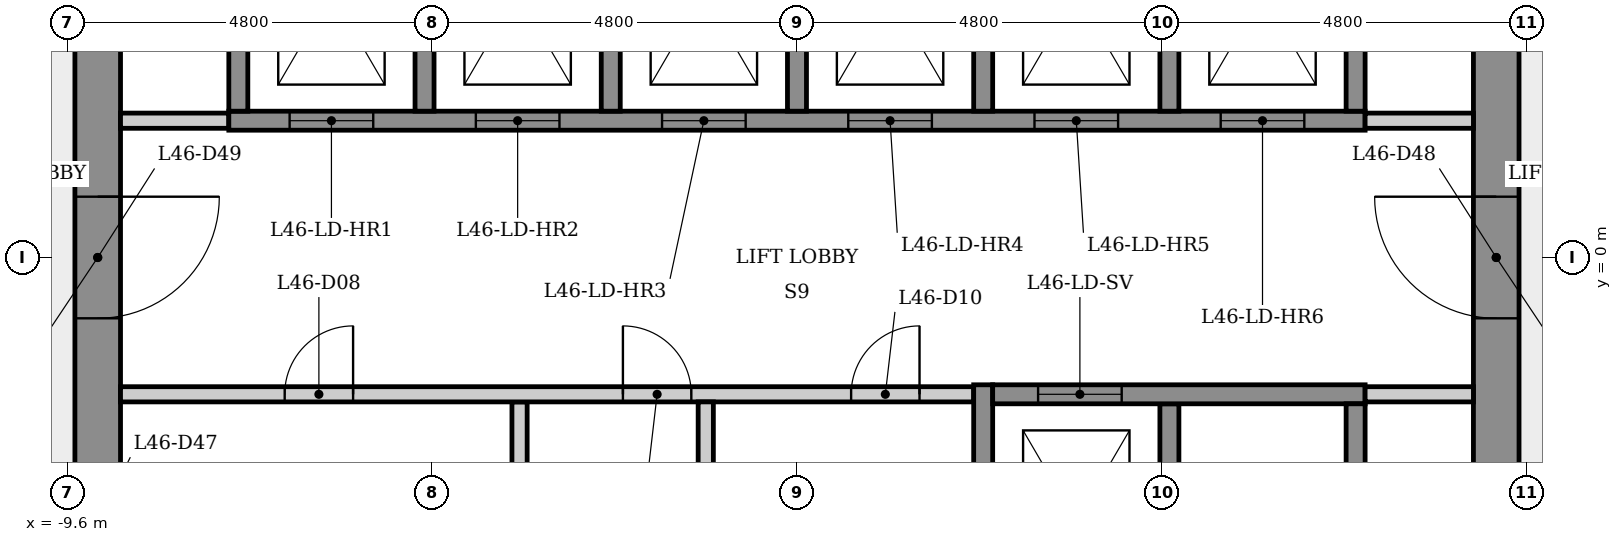
"""IFC4 building model, lengths in metres.
Left out: names, types, materials, properties, quantities, classifications, styles, units other than length and angle.
Written with IfcOpenShell. Run it as: python <this file> out.ifc"""

import sys

from ifc_helpers import new_model, si_unit, direction, frame, frame_2d, origin, place, context, subcontext, project, spatial, rectangle, extrude, element, fill, save


model = new_model("IFC4")
c1 = context("Model", 3, precision=1e-05, world=origin(), true_north=direction((0.0, 1.0)))
c2 = subcontext(c1, "Body", "Model", "MODEL_VIEW")
j1 = project(units=[si_unit("LENGTHUNIT", "METRE"), si_unit("PLANEANGLEUNIT", "RADIAN")], contexts=[c1])
p1 = place(None, origin())
s1 = spatial("IfcSite", under=j1, at=p1, CompositionType="ELEMENT")
p2 = place(p1, origin())
s2 = spatial("IfcBuilding", under=s1, at=p2, CompositionType="ELEMENT")
p3 = place(p2, frame((0.0, 0.0, 173.1)))
s3 = spatial("IfcBuildingStorey", under=s2, at=p3, CompositionType="ELEMENT", Elevation=173.1)
p4 = place(p3, frame((9.2, -5.485, 0.0), z_axis=(0.0, 0.0, 1.0), x_axis=(0.0, 1.0, 0.0)))
e1 = element("IfcWall", 1, at=p4, inside=s3, PredefinedType="SHEAR", context=c2, shape_type="SweptSolid", body=[
    extrude(rectangle(XDim=10.97, YDim=0.6, at=frame_2d((5.485, 0.0))), origin(), (0.0, 0.0, 1.0), 3.4),
])
p5 = place(p4, frame((4.685, 0.0, 0.0)))
e2 = element("IfcOpeningElement", 2, at=p5, cuts=e1, PredefinedType="OPENING", context=c2, shape_type="SweptSolid", body=[
    extrude(rectangle(XDim=1.6, YDim=2.1, at=frame_2d((0.8, 1.05))), frame((0.0, 0.31, 0.0), z_axis=(0.0, -1.0, 0.0), x_axis=(1.0, 0.0, 0.0)), (0.0, 0.0, 1.0), 0.62),
])
p6 = place(p3, frame((-9.2, 5.485, 0.0), z_axis=(0.0, 0.0, 1.0), x_axis=(0.0, -1.0, 0.0)))
e3 = element("IfcWall", 3, at=p6, inside=s3, PredefinedType="SHEAR", context=c2, shape_type="SweptSolid", body=[
    extrude(rectangle(XDim=10.97, YDim=0.6, at=frame_2d((5.485, 0.0))), origin(), (0.0, 0.0, 1.0), 3.4),
])
p7 = place(p6, frame((8.516, 0.0, 0.0)))
e4 = element("IfcOpeningElement", 4, at=p7, cuts=e3, PredefinedType="OPENING", context=c2, shape_type="SweptSolid", body=[
    extrude(rectangle(XDim=0.9, YDim=2.1, at=frame_2d((0.45, 1.05))), frame((0.0, 0.31, 0.0), z_axis=(0.0, -1.0, 0.0), x_axis=(1.0, 0.0, 0.0)), (0.0, 0.0, 1.0), 0.62),
])
p8 = place(p6, frame((4.685, 0.0, 0.0)))
e5 = element("IfcOpeningElement", 5, at=p8, cuts=e3, PredefinedType="OPENING", context=c2, shape_type="SweptSolid", body=[
    extrude(rectangle(XDim=1.6, YDim=2.1, at=frame_2d((0.8, 1.05))), frame((0.0, 0.31, 0.0), z_axis=(0.0, -1.0, 0.0), x_axis=(1.0, 0.0, 0.0)), (0.0, 0.0, 1.0), 0.62),
])
p9 = place(p3, frame((-8.9, 1.8, 0.0), z_axis=(0.0, 0.0, 1.0), x_axis=(1.0, 0.0, 0.0)))
e6 = element("IfcWall", 6, at=p9, inside=s3, PredefinedType="PARTITIONING", context=c2, shape_type="SweptSolid", body=[
    extrude(rectangle(XDim=1.425, YDim=0.2, at=frame_2d((0.712, 0.0))), origin(), (0.0, 0.0, 1.0), 3.05),
])
p10 = place(p3, frame((-7.475, 1.8, 0.0), z_axis=(0.0, 0.0, 1.0), x_axis=(1.0, 0.0, 0.0)))
e7 = element("IfcWall", 7, at=p10, inside=s3, PredefinedType="SHEAR", context=c2, shape_type="SweptSolid", body=[
    extrude(rectangle(XDim=14.95, YDim=0.25, at=frame_2d((7.475, 0.0))), origin(), (0.0, 0.0, 1.0), 3.05),
])
p11 = place(p10, frame((0.8, 0.0, 0.0)))
e8 = element("IfcOpeningElement", 8, at=p11, cuts=e7, PredefinedType="OPENING", context=c2, shape_type="SweptSolid", body=[
    extrude(rectangle(XDim=1.1, YDim=2.1, at=frame_2d((0.55, 1.05))), frame((0.0, 0.135, 0.0), z_axis=(0.0, -1.0, 0.0), x_axis=(1.0, 0.0, 0.0)), (0.0, 0.0, 1.0), 0.27),
])
p12 = place(p10, frame((3.25, 0.0, 0.0)))
e9 = element("IfcOpeningElement", 9, at=p12, cuts=e7, PredefinedType="OPENING", context=c2, shape_type="SweptSolid", body=[
    extrude(rectangle(XDim=1.1, YDim=2.1, at=frame_2d((0.55, 1.05))), frame((0.0, 0.135, 0.0), z_axis=(0.0, -1.0, 0.0), x_axis=(1.0, 0.0, 0.0)), (0.0, 0.0, 1.0), 0.27),
])
p13 = place(p10, frame((5.7, 0.0, 0.0)))
e10 = element("IfcOpeningElement", 10, at=p13, cuts=e7, PredefinedType="OPENING", context=c2, shape_type="SweptSolid", body=[
    extrude(rectangle(XDim=1.1, YDim=2.1, at=frame_2d((0.55, 1.05))), frame((0.0, 0.135, 0.0), z_axis=(0.0, -1.0, 0.0), x_axis=(1.0, 0.0, 0.0)), (0.0, 0.0, 1.0), 0.27),
])
p14 = place(p10, frame((8.15, 0.0, 0.0)))
e11 = element("IfcOpeningElement", 11, at=p14, cuts=e7, PredefinedType="OPENING", context=c2, shape_type="SweptSolid", body=[
    extrude(rectangle(XDim=1.1, YDim=2.1, at=frame_2d((0.55, 1.05))), frame((0.0, 0.135, 0.0), z_axis=(0.0, -1.0, 0.0), x_axis=(1.0, 0.0, 0.0)), (0.0, 0.0, 1.0), 0.27),
])
p15 = place(p10, frame((10.6, 0.0, 0.0)))
e12 = element("IfcOpeningElement", 12, at=p15, cuts=e7, PredefinedType="OPENING", context=c2, shape_type="SweptSolid", body=[
    extrude(rectangle(XDim=1.1, YDim=2.1, at=frame_2d((0.55, 1.05))), frame((0.0, 0.135, 0.0), z_axis=(0.0, -1.0, 0.0), x_axis=(1.0, 0.0, 0.0)), (0.0, 0.0, 1.0), 0.27),
])
p16 = place(p10, frame((13.05, 0.0, 0.0)))
e13 = element("IfcOpeningElement", 13, at=p16, cuts=e7, PredefinedType="OPENING", context=c2, shape_type="SweptSolid", body=[
    extrude(rectangle(XDim=1.1, YDim=2.1, at=frame_2d((0.55, 1.05))), frame((0.0, 0.135, 0.0), z_axis=(0.0, -1.0, 0.0), x_axis=(1.0, 0.0, 0.0)), (0.0, 0.0, 1.0), 0.27),
])
p17 = place(p3, frame((-7.35, 1.925, 0.0), z_axis=(0.0, 0.0, 1.0), x_axis=(0.0, 1.0, 0.0)))
e14 = element("IfcWall", 14, at=p17, inside=s3, PredefinedType="SHEAR", context=c2, shape_type="SweptSolid", body=[
    extrude(rectangle(XDim=4.036, YDim=0.25, at=frame_2d((2.018, 0.0))), origin(), (0.0, 0.0, 1.0), 3.05),
])
p18 = place(p3, frame((-4.9, 5.025, 0.0), z_axis=(0.0, 0.0, 1.0), x_axis=(0.0, -1.0, 0.0)))
e15 = element("IfcWall", 15, at=p18, inside=s3, PredefinedType="SHEAR", context=c2, shape_type="SweptSolid", body=[
    extrude(rectangle(XDim=3.1, YDim=0.25, at=frame_2d((1.55, 0.0))), origin(), (0.0, 0.0, 1.0), 3.4),
])
p19 = place(p3, frame((-3.65, -1.9, 0.0), z_axis=(0.0, 0.0, 1.0), x_axis=(0.0, -1.0, 0.0)))
e16 = element("IfcWall", 16, at=p19, inside=s3, PredefinedType="PARTITIONING", context=c2, shape_type="SweptSolid", body=[
    extrude(rectangle(XDim=3.15, YDim=0.2, at=frame_2d((1.575, 0.0))), origin(), (0.0, 0.0, 1.0), 3.05),
])
p20 = place(p3, frame((-8.9, -1.8, 0.0), z_axis=(0.0, 0.0, 1.0), x_axis=(1.0, 0.0, 0.0)))
e17 = element("IfcWall", 17, at=p20, inside=s3, PredefinedType="PARTITIONING", context=c2, shape_type="SweptSolid", body=[
    extrude(rectangle(XDim=11.225, YDim=0.2, at=frame_2d((5.613, 0.0))), origin(), (0.0, 0.0, 1.0), 3.05),
])
p21 = place(p20, frame((2.16, 0.0, 0.0)))
e18 = element("IfcOpeningElement", 18, at=p21, cuts=e17, PredefinedType="OPENING", context=c2, shape_type="SweptSolid", body=[
    extrude(rectangle(XDim=0.9, YDim=2.1, at=frame_2d((0.45, 1.05))), frame((0.0, 0.11, 0.0), z_axis=(0.0, -1.0, 0.0), x_axis=(1.0, 0.0, 0.0)), (0.0, 0.0, 1.0), 0.22),
])
p22 = place(p20, frame((6.61, 0.0, 0.0)))
e19 = element("IfcOpeningElement", 19, at=p22, cuts=e17, PredefinedType="OPENING", context=c2, shape_type="SweptSolid", body=[
    extrude(rectangle(XDim=0.9, YDim=2.1, at=frame_2d((0.45, 1.05))), frame((0.0, 0.11, 0.0), z_axis=(0.0, -1.0, 0.0), x_axis=(1.0, 0.0, 0.0)), (0.0, 0.0, 1.0), 0.22),
])
p23 = place(p20, frame((9.613, 0.0, 0.0)))
e20 = element("IfcOpeningElement", 20, at=p23, cuts=e17, PredefinedType="OPENING", context=c2, shape_type="SweptSolid", body=[
    extrude(rectangle(XDim=0.9, YDim=2.1, at=frame_2d((0.45, 1.05))), frame((0.0, 0.11, 0.0), z_axis=(0.0, -1.0, 0.0), x_axis=(1.0, 0.0, 0.0)), (0.0, 0.0, 1.0), 0.22),
])
p24 = place(p3, frame((-2.45, 5.025, 0.0), z_axis=(0.0, 0.0, 1.0), x_axis=(0.0, -1.0, 0.0)))
e21 = element("IfcWall", 21, at=p24, inside=s3, PredefinedType="SHEAR", context=c2, shape_type="SweptSolid", body=[
    extrude(rectangle(XDim=3.1, YDim=0.25, at=frame_2d((1.55, 0.0))), origin(), (0.0, 0.0, 1.0), 3.4),
])
p25 = place(p3, frame((-1.2, -1.9, 0.0), z_axis=(0.0, 0.0, 1.0), x_axis=(0.0, -1.0, 0.0)))
e22 = element("IfcWall", 22, at=p25, inside=s3, PredefinedType="PARTITIONING", context=c2, shape_type="SweptSolid", body=[
    extrude(rectangle(XDim=3.15, YDim=0.2, at=frame_2d((1.575, 0.0))), origin(), (0.0, 0.0, 1.0), 3.05),
])
p26 = place(p3, frame((0.0, 5.025, 0.0), z_axis=(0.0, 0.0, 1.0), x_axis=(0.0, -1.0, 0.0)))
e23 = element("IfcWall", 23, at=p26, inside=s3, PredefinedType="SHEAR", context=c2, shape_type="SweptSolid", body=[
    extrude(rectangle(XDim=3.1, YDim=0.25, at=frame_2d((1.55, 0.0))), origin(), (0.0, 0.0, 1.0), 3.4),
])
p27 = place(p3, frame((2.45, -5.275, 0.0), z_axis=(0.0, 0.0, 1.0), x_axis=(0.0, 1.0, 0.0)))
e24 = element("IfcWall", 24, at=p27, inside=s3, PredefinedType="SHEAR", context=c2, shape_type="SweptSolid", body=[
    extrude(rectangle(XDim=3.6, YDim=0.25, at=frame_2d((1.8, 0.0))), origin(), (0.0, 0.0, 1.0), 3.05),
])
for number, where, z_axis, x_axis in (
    (25, (2.45, 5.025, 0.0), (0.0, 0.0, 1.0), (0.0, -1.0, 0.0)),
    (26, (4.9, -1.925, 0.0), (0.0, 0.0, 1.0), (0.0, -1.0, 0.0)),
    (27, (4.9, 5.025, 0.0), (0.0, 0.0, 1.0), (0.0, -1.0, 0.0)),
):
    element("IfcWall", number, at=place(p3, frame(where, z_axis=z_axis, x_axis=x_axis)), inside=s3, PredefinedType="SHEAR", context=c2, shape_type="SweptSolid", body=[
        extrude(rectangle(XDim=3.1, YDim=0.25, at=frame_2d((1.55, 0.0))), origin(), (0.0, 0.0, 1.0), 3.4),
    ])
p28 = place(p3, frame((2.575, -1.8, 0.0), z_axis=(0.0, 0.0, 1.0), x_axis=(1.0, 0.0, 0.0)))
e28 = element("IfcWall", 28, at=p28, inside=s3, PredefinedType="SHEAR", context=c2, shape_type="SweptSolid", body=[
    extrude(rectangle(XDim=4.9, YDim=0.25, at=frame_2d((2.45, 0.0))), origin(), (0.0, 0.0, 1.0), 3.05),
])
p29 = place(p28, frame((0.597, 0.0, 0.0)))
e29 = element("IfcOpeningElement", 29, at=p29, cuts=e28, PredefinedType="OPENING", context=c2, shape_type="SweptSolid", body=[
    extrude(rectangle(XDim=1.1, YDim=2.1, at=frame_2d((0.55, 1.05))), frame((0.0, 0.135, 0.0), z_axis=(0.0, -1.0, 0.0), x_axis=(1.0, 0.0, 0.0)), (0.0, 0.0, 1.0), 0.27),
])
p30 = place(p3, frame((7.475, 1.8, 0.0), z_axis=(0.0, 0.0, 1.0), x_axis=(1.0, 0.0, 0.0)))
e30 = element("IfcWall", 30, at=p30, inside=s3, PredefinedType="PARTITIONING", context=c2, shape_type="SweptSolid", body=[
    extrude(rectangle(XDim=1.425, YDim=0.2, at=frame_2d((0.712, 0.0))), origin(), (0.0, 0.0, 1.0), 3.05),
])
for number, where, z_axis, x_axis in (
    (31, (7.35, -1.925, 0.0), (0.0, 0.0, 1.0), (0.0, -1.0, 0.0)),
    (32, (7.35, 5.025, 0.0), (0.0, 0.0, 1.0), (0.0, -1.0, 0.0)),
):
    element("IfcWall", number, at=place(p3, frame(where, z_axis=z_axis, x_axis=x_axis)), inside=s3, PredefinedType="SHEAR", context=c2, shape_type="SweptSolid", body=[
        extrude(rectangle(XDim=3.1, YDim=0.25, at=frame_2d((1.55, 0.0))), origin(), (0.0, 0.0, 1.0), 3.4),
    ])
p31 = place(p3, frame((8.9, -1.8, 0.0), z_axis=(0.0, 0.0, 1.0), x_axis=(-1.0, 0.0, 0.0)))
e33 = element("IfcWall", 33, at=p31, inside=s3, PredefinedType="PARTITIONING", context=c2, shape_type="SweptSolid", body=[
    extrude(rectangle(XDim=1.425, YDim=0.2, at=frame_2d((0.712, 0.0))), origin(), (0.0, 0.0, 1.0), 3.05),
])
p32 = place(p11, origin())
e34 = element("IfcDoor", 34, at=p32, inside=s3, OperationType="SLIDING_TO_LEFT", PredefinedType="DOOR", context=c2, shape_type="SweptSolid", body=[
    extrude(rectangle(XDim=1.1, YDim=2.1, at=frame_2d((0.55, 1.05))), frame((0.0, 0.025, 0.0), z_axis=(0.0, -1.0, 0.0), x_axis=(1.0, 0.0, 0.0)), (0.0, 0.0, 1.0), 0.05),
])
fill(e8, e34)
p33 = place(p12, origin())
e35 = element("IfcDoor", 35, at=p33, inside=s3, OperationType="SLIDING_TO_LEFT", PredefinedType="DOOR", context=c2, shape_type="SweptSolid", body=[
    extrude(rectangle(XDim=1.1, YDim=2.1, at=frame_2d((0.55, 1.05))), frame((0.0, 0.025, 0.0), z_axis=(0.0, -1.0, 0.0), x_axis=(1.0, 0.0, 0.0)), (0.0, 0.0, 1.0), 0.05),
])
fill(e9, e35)
p34 = place(p13, origin())
e36 = element("IfcDoor", 36, at=p34, inside=s3, OperationType="SLIDING_TO_LEFT", PredefinedType="DOOR", context=c2, shape_type="SweptSolid", body=[
    extrude(rectangle(XDim=1.1, YDim=2.1, at=frame_2d((0.55, 1.05))), frame((0.0, 0.025, 0.0), z_axis=(0.0, -1.0, 0.0), x_axis=(1.0, 0.0, 0.0)), (0.0, 0.0, 1.0), 0.05),
])
fill(e10, e36)
p35 = place(p14, origin())
e37 = element("IfcDoor", 37, at=p35, inside=s3, OperationType="SLIDING_TO_LEFT", PredefinedType="DOOR", context=c2, shape_type="SweptSolid", body=[
    extrude(rectangle(XDim=1.1, YDim=2.1, at=frame_2d((0.55, 1.05))), frame((0.0, 0.025, 0.0), z_axis=(0.0, -1.0, 0.0), x_axis=(1.0, 0.0, 0.0)), (0.0, 0.0, 1.0), 0.05),
])
fill(e11, e37)
p36 = place(p15, origin())
e38 = element("IfcDoor", 38, at=p36, inside=s3, OperationType="SLIDING_TO_LEFT", PredefinedType="DOOR", context=c2, shape_type="SweptSolid", body=[
    extrude(rectangle(XDim=1.1, YDim=2.1, at=frame_2d((0.55, 1.05))), frame((0.0, 0.025, 0.0), z_axis=(0.0, -1.0, 0.0), x_axis=(1.0, 0.0, 0.0)), (0.0, 0.0, 1.0), 0.05),
])
fill(e12, e38)
p37 = place(p16, origin())
e39 = element("IfcDoor", 39, at=p37, inside=s3, OperationType="SLIDING_TO_LEFT", PredefinedType="DOOR", context=c2, shape_type="SweptSolid", body=[
    extrude(rectangle(XDim=1.1, YDim=2.1, at=frame_2d((0.55, 1.05))), frame((0.0, 0.025, 0.0), z_axis=(0.0, -1.0, 0.0), x_axis=(1.0, 0.0, 0.0)), (0.0, 0.0, 1.0), 0.05),
])
fill(e13, e39)
p38 = place(p29, origin())
e40 = element("IfcDoor", 40, at=p38, inside=s3, OperationType="SLIDING_TO_LEFT", PredefinedType="DOOR", context=c2, shape_type="SweptSolid", body=[
    extrude(rectangle(XDim=1.1, YDim=2.1, at=frame_2d((0.55, 1.05))), frame((0.0, 0.025, 0.0), z_axis=(0.0, -1.0, 0.0), x_axis=(1.0, 0.0, 0.0)), (0.0, 0.0, 1.0), 0.05),
])
fill(e29, e40)
p39 = place(p21, origin())
e41 = element("IfcDoor", 41, at=p39, inside=s3, OperationType="SINGLE_SWING_RIGHT", PredefinedType="DOOR", context=c2, shape_type="SweptSolid", body=[
    extrude(rectangle(XDim=0.9, YDim=2.1, at=frame_2d((0.45, 1.05))), frame((0.0, 0.025, 0.0), z_axis=(0.0, -1.0, 0.0), x_axis=(1.0, 0.0, 0.0)), (0.0, 0.0, 1.0), 0.05),
])
fill(e18, e41)
p40 = place(p22, origin())
e42 = element("IfcDoor", 42, at=p40, inside=s3, OperationType="SINGLE_SWING_LEFT", PredefinedType="DOOR", context=c2, shape_type="SweptSolid", body=[
    extrude(rectangle(XDim=0.9, YDim=2.1, at=frame_2d((0.45, 1.05))), frame((0.0, 0.025, 0.0), z_axis=(0.0, -1.0, 0.0), x_axis=(1.0, 0.0, 0.0)), (0.0, 0.0, 1.0), 0.05),
])
fill(e19, e42)
p41 = place(p23, origin())
e43 = element("IfcDoor", 43, at=p41, inside=s3, OperationType="SINGLE_SWING_RIGHT", PredefinedType="DOOR", context=c2, shape_type="SweptSolid", body=[
    extrude(rectangle(XDim=0.9, YDim=2.1, at=frame_2d((0.45, 1.05))), frame((0.0, 0.025, 0.0), z_axis=(0.0, -1.0, 0.0), x_axis=(1.0, 0.0, 0.0)), (0.0, 0.0, 1.0), 0.05),
])
fill(e20, e43)
p42 = place(p5, origin())
e44 = element("IfcDoor", 44, at=p42, inside=s3, OperationType="SINGLE_SWING_RIGHT", PredefinedType="DOOR", context=c2, shape_type="SweptSolid", body=[
    extrude(rectangle(XDim=1.6, YDim=2.1, at=frame_2d((0.8, 1.05))), frame((0.0, 0.025, 0.0), z_axis=(0.0, -1.0, 0.0), x_axis=(1.0, 0.0, 0.0)), (0.0, 0.0, 1.0), 0.05),
])
fill(e2, e44)
p43 = place(p8, origin())
e45 = element("IfcDoor", 45, at=p43, inside=s3, OperationType="SINGLE_SWING_LEFT", PredefinedType="DOOR", context=c2, shape_type="SweptSolid", body=[
    extrude(rectangle(XDim=1.6, YDim=2.1, at=frame_2d((0.8, 1.05))), frame((0.0, 0.025, 0.0), z_axis=(0.0, -1.0, 0.0), x_axis=(1.0, 0.0, 0.0)), (0.0, 0.0, 1.0), 0.05),
])
fill(e5, e45)
save(model, sys.argv[1])
